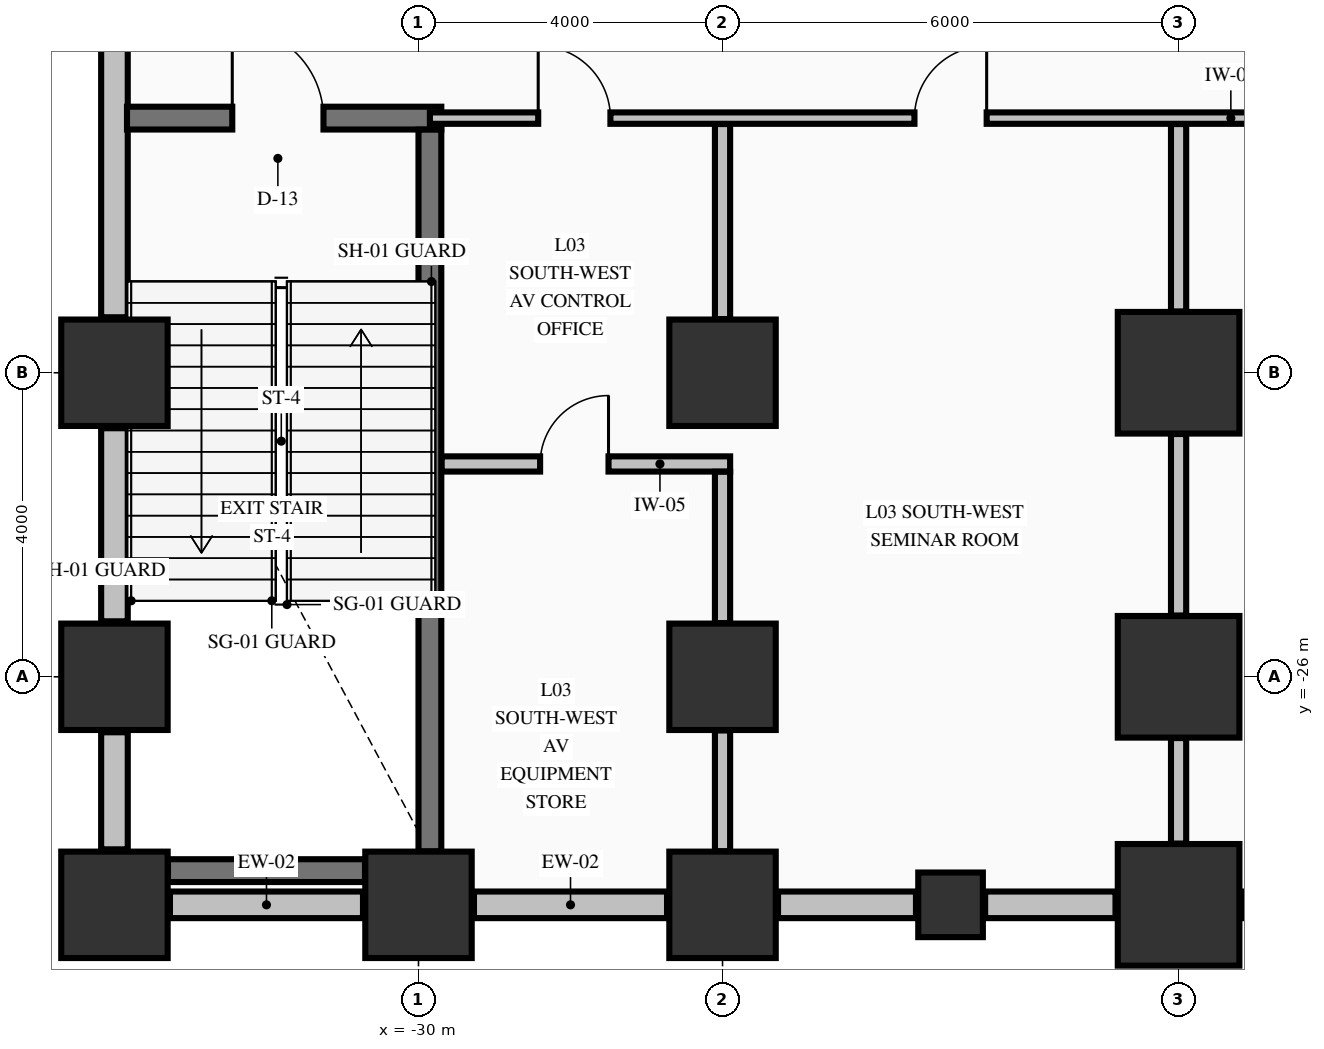
"""IFC4 building model, lengths in metres.
Left out: names, types, materials, properties, quantities, classifications, styles, units other than length and angle.
Written with IfcOpenShell. Run it as: python <this file> out.ifc"""

import sys

from ifc_helpers import new_model, si_unit, direction, frame, frame_2d, origin, origin_2d, place, context, subcontext, project, spatial, rectangle, extrude, element, fill, save


model = new_model("IFC4")
c1 = context("Model", 3, precision=1e-05, world=origin(), true_north=direction((0.0, 1.0)))
c2 = subcontext(c1, "Body", "Model", "MODEL_VIEW")
j1 = project(units=[si_unit("LENGTHUNIT", "METRE"), si_unit("PLANEANGLEUNIT", "RADIAN")], contexts=[c1])
p1 = place(None, origin())
s1 = spatial("IfcSite", under=j1, at=p1, CompositionType="ELEMENT")
p2 = place(p1, origin())
s2 = spatial("IfcBuilding", under=s1, at=p2, CompositionType="ELEMENT")
p3 = place(p2, frame((0.0, 0.0, 16.32)))
s3 = spatial("IfcBuildingStorey", under=s2, at=p3, CompositionType="ELEMENT", Elevation=16.32)
for number, where, z_axis, x_axis in (
    (1, (-34.0, -29.0, 0.0), (0.0, 0.0, 1.0), (1.0, 0.0, 0.0)),
    (2, (-34.0, -26.0, 0.0), (0.0, 0.0, 1.0), (1.0, 0.0, 0.0)),
    (3, (-34.0, -22.0, 0.0), (0.0, 0.0, 1.0), (1.0, 0.0, 0.0)),
    (4, (-30.0, -29.0, 0.0), (0.0, 0.0, 1.0), (1.0, 0.0, 0.0)),
    (5, (-26.0, -29.0, 0.0), (0.0, 0.0, 1.0), (1.0, 0.0, 0.0)),
    (6, (-26.0, -26.0, 0.0), (0.0, 0.0, 1.0), (1.0, 0.0, 0.0)),
    (7, (-26.0, -22.0, 0.0), (0.0, 0.0, 1.0), (1.0, 0.0, 0.0)),
):
    element("IfcColumn", number, at=place(p3, frame(where, z_axis=z_axis, x_axis=x_axis)), inside=s3, PredefinedType="COLUMN", context=c2, shape_type="SweptSolid", body=[
        extrude(rectangle(XDim=1.4, YDim=1.4, at=origin_2d()), origin(), (0.0, 0.0, 1.0), 4.99),
    ])
for number, where, z_axis, x_axis in (
    (8, (-20.0, -29.0, 0.0), (0.0, 0.0, 1.0), (1.0, 0.0, 0.0)),
    (9, (-20.0, -26.0, 0.0), (0.0, 0.0, 1.0), (1.0, 0.0, 0.0)),
    (10, (-20.0, -22.0, 0.0), (0.0, 0.0, 1.0), (1.0, 0.0, 0.0)),
):
    element("IfcColumn", number, at=place(p3, frame(where, z_axis=z_axis, x_axis=x_axis)), inside=s3, PredefinedType="COLUMN", context=c2, shape_type="SweptSolid", body=[
        extrude(rectangle(XDim=1.6, YDim=1.6, at=origin_2d()), origin(), (0.0, 0.0, 1.0), 4.99),
    ])
p4 = place(p3, frame((-23.0, -29.0, 0.0), z_axis=(0.0, 0.0, 1.0), x_axis=(1.0, 0.0, 0.0)))
e11 = element("IfcColumn", 11, at=p4, inside=s3, PredefinedType="PILASTER", context=c2, shape_type="SweptSolid", body=[
    extrude(rectangle(XDim=0.85, YDim=0.85, at=origin_2d()), origin(), (0.0, 0.0, 1.0), 4.99),
])
for number, where, z_axis, x_axis in (
    (12, (-33.27, -29.0, 0.0), (0.0, 0.0, 1.0), (1.0, 0.0, 0.0)),
    (13, (-29.27, -29.0, 0.0), (0.0, 0.0, 1.0), (1.0, 0.0, 0.0)),
):
    element("IfcWall", number, at=place(p3, frame(where, z_axis=z_axis, x_axis=x_axis)), inside=s3, PredefinedType="STANDARD", context=c2, shape_type="SweptSolid", body=[
        extrude(rectangle(XDim=2.54, YDim=0.35, at=frame_2d((1.27, 0.0))), origin(), (0.0, 0.0, 1.0), 3.332),
    ])
p5 = place(p3, frame((-25.27, -29.0, 0.0), z_axis=(0.0, 0.0, 1.0), x_axis=(1.0, 0.0, 0.0)))
e14 = element("IfcWall", 14, at=p5, inside=s3, PredefinedType="STANDARD", context=c2, shape_type="SweptSolid", body=[
    extrude(rectangle(XDim=1.815, YDim=0.35, at=frame_2d((0.907, 0.0))), origin(), (0.0, 0.0, 1.0), 3.332),
])
p6 = place(p3, frame((-22.545, -29.0, 0.0), z_axis=(0.0, 0.0, 1.0), x_axis=(1.0, 0.0, 0.0)))
e15 = element("IfcWall", 15, at=p6, inside=s3, PredefinedType="STANDARD", context=c2, shape_type="SweptSolid", body=[
    extrude(rectangle(XDim=1.715, YDim=0.35, at=frame_2d((0.857, 0.0))), origin(), (0.0, 0.0, 1.0), 3.332),
])
p7 = place(p3, frame((-19.17, -29.0, 0.0), z_axis=(0.0, 0.0, 1.0), x_axis=(1.0, 0.0, 0.0)))
e16 = element("IfcWall", 16, at=p7, inside=s3, PredefinedType="STANDARD", context=c2, shape_type="SweptSolid", body=[
    extrude(rectangle(XDim=7.34, YDim=0.35, at=frame_2d((3.67, 0.0))), origin(), (0.0, 0.0, 1.0), 3.332),
])
p8 = place(p3, frame((-34.0, -28.27, 0.0), z_axis=(0.0, 0.0, 1.0), x_axis=(0.0, 1.0, 0.0)))
e17 = element("IfcWall", 17, at=p8, inside=s3, PredefinedType="STANDARD", context=c2, shape_type="SweptSolid", body=[
    extrude(rectangle(XDim=1.54, YDim=0.35, at=frame_2d((0.77, 0.0))), origin(), (0.0, 0.0, 1.0), 4.99),
])
p9 = place(p3, frame((-34.0, -25.27, 0.0), z_axis=(0.0, 0.0, 1.0), x_axis=(0.0, 1.0, 0.0)))
e18 = element("IfcWall", 18, at=p9, inside=s3, PredefinedType="STANDARD", context=c2, shape_type="SweptSolid", body=[
    extrude(rectangle(XDim=2.54, YDim=0.35, at=frame_2d((1.27, 0.0))), origin(), (0.0, 0.0, 1.0), 4.99),
])
p10 = place(p3, frame((-34.0, -21.27, 0.0), z_axis=(0.0, 0.0, 1.0), x_axis=(0.0, 1.0, 0.0)))
e19 = element("IfcWall", 19, at=p10, inside=s3, PredefinedType="STANDARD", context=c2, shape_type="SweptSolid", body=[
    extrude(rectangle(XDim=4.54, YDim=0.35, at=frame_2d((2.27, 0.0))), origin(), (0.0, 0.0, 1.0), 4.99),
])
p11 = place(p3, frame((-33.296, -28.55, 0.0), z_axis=(0.0, 0.0, 1.0), x_axis=(1.0, 0.0, 0.0)))
e20 = element("IfcWall", 20, at=p11, inside=s3, PredefinedType="SHEAR", context=c2, shape_type="SweptSolid", body=[
    extrude(rectangle(XDim=2.592, YDim=0.3, at=frame_2d((1.296, 0.0))), origin(), (0.0, 0.0, 1.0), 4.99),
])
p12 = place(p3, frame((-33.835, -18.65, 0.0), z_axis=(0.0, 0.0, 1.0), x_axis=(1.0, 0.0, 0.0)))
e21 = element("IfcWall", 21, at=p12, inside=s3, PredefinedType="SHEAR", context=c2, shape_type="SweptSolid", body=[
    extrude(rectangle(XDim=4.135, YDim=0.3, at=frame_2d((2.067, 0.0))), origin(), (0.0, 0.0, 1.0), 4.99),
])
p13 = place(p12, frame((1.385, 0.0, 0.0)))
e22 = element("IfcOpeningElement", 22, at=p13, cuts=e21, PredefinedType="OPENING", context=c2, shape_type="SweptSolid", body=[
    extrude(rectangle(XDim=1.2, YDim=2.15, at=frame_2d((0.6, 1.075))), frame((0.0, 0.16, 0.0), z_axis=(0.0, -1.0, 0.0), x_axis=(1.0, 0.0, 0.0)), (0.0, 0.0, 1.0), 0.32),
])
p14 = place(p3, frame((-29.697, -23.2, 0.0), z_axis=(0.0, 0.0, 1.0), x_axis=(1.0, 0.0, 0.0)))
e23 = element("IfcWall", 23, at=p14, inside=s3, PredefinedType="PARTITIONING", context=c2, shape_type="SweptSolid", body=[
    extrude(rectangle(XDim=3.797, YDim=0.2, at=frame_2d((1.898, 0.0))), origin(), (0.0, 0.0, 1.0), 4.99),
])
p15 = place(p14, frame((1.297, 0.0, 0.0)))
e24 = element("IfcOpeningElement", 24, at=p15, cuts=e23, PredefinedType="OPENING", context=c2, shape_type="SweptSolid", body=[
    extrude(rectangle(XDim=0.9, YDim=2.15, at=frame_2d((0.45, 1.075))), frame((0.0, 0.11, 0.0), z_axis=(0.0, -1.0, 0.0), x_axis=(1.0, 0.0, 0.0)), (0.0, 0.0, 1.0), 0.22),
])
p16 = place(p3, frame((-29.85, -18.65, 0.0), z_axis=(0.0, 0.0, 1.0), x_axis=(1.0, 0.0, 0.0)))
e25 = element("IfcWall", 25, at=p16, inside=s3, PredefinedType="PARTITIONING", context=c2, shape_type="SweptSolid", body=[
    extrude(rectangle(XDim=21.085, YDim=0.15, at=frame_2d((10.542, 0.0))), origin(), (0.0, 0.0, 1.0), 4.99),
])
p17 = place(p16, frame((1.425, 0.0, 0.0)))
e26 = element("IfcOpeningElement", 26, at=p17, cuts=e25, PredefinedType="OPENING", context=c2, shape_type="SweptSolid", body=[
    extrude(rectangle(XDim=0.95, YDim=2.15, at=frame_2d((0.475, 1.075))), frame((0.0, 0.085, 0.0), z_axis=(0.0, -1.0, 0.0), x_axis=(1.0, 0.0, 0.0)), (0.0, 0.0, 1.0), 0.17),
])
p18 = place(p16, frame((6.375, 0.0, 0.0)))
e27 = element("IfcOpeningElement", 27, at=p18, cuts=e25, PredefinedType="OPENING", context=c2, shape_type="SweptSolid", body=[
    extrude(rectangle(XDim=0.95, YDim=2.15, at=frame_2d((0.475, 1.075))), frame((0.0, 0.085, 0.0), z_axis=(0.0, -1.0, 0.0), x_axis=(1.0, 0.0, 0.0)), (0.0, 0.0, 1.0), 0.17),
])
p19 = place(p16, frame((13.75, 0.0, 0.0)))
e28 = element("IfcOpeningElement", 28, at=p19, cuts=e25, PredefinedType="OPENING", context=c2, shape_type="SweptSolid", body=[
    extrude(rectangle(XDim=1.2, YDim=2.15, at=frame_2d((0.6, 1.075))), frame((0.0, 0.085, 0.0), z_axis=(0.0, -1.0, 0.0), x_axis=(1.0, 0.0, 0.0)), (0.0, 0.0, 1.0), 0.17),
])
p20 = place(p16, frame((19.575, 0.0, 0.0)))
e29 = element("IfcOpeningElement", 29, at=p20, cuts=e25, PredefinedType="OPENING", context=c2, shape_type="SweptSolid", body=[
    extrude(rectangle(XDim=0.95, YDim=2.15, at=frame_2d((0.475, 1.075))), frame((0.0, 0.085, 0.0), z_axis=(0.0, -1.0, 0.0), x_axis=(1.0, 0.0, 0.0)), (0.0, 0.0, 1.0), 0.17),
])
p21 = place(p3, frame((-29.85, -28.296, 0.0), z_axis=(0.0, 0.0, 1.0), x_axis=(0.0, 1.0, 0.0)))
e30 = element("IfcWall", 30, at=p21, inside=s3, PredefinedType="SHEAR", context=c2, shape_type="SweptSolid", body=[
    extrude(rectangle(XDim=9.494, YDim=0.3, at=frame_2d((4.747, 0.0))), origin(), (0.0, 0.0, 1.0), 4.99),
])
p22 = place(p3, frame((-26.0, -28.294, 0.0), z_axis=(0.0, 0.0, 1.0), x_axis=(0.0, 1.0, 0.0)))
e31 = element("IfcWall", 31, at=p22, inside=s3, PredefinedType="PARTITIONING", context=c2, shape_type="SweptSolid", body=[
    extrude(rectangle(XDim=1.588, YDim=0.2, at=frame_2d((0.794, 0.0))), origin(), (0.0, 0.0, 1.0), 3.332),
])
p23 = place(p3, frame((-26.0, -25.294, 0.0), z_axis=(0.0, 0.0, 1.0), x_axis=(0.0, 1.0, 0.0)))
e32 = element("IfcWall", 32, at=p23, inside=s3, PredefinedType="PARTITIONING", context=c2, shape_type="SweptSolid", body=[
    extrude(rectangle(XDim=1.991, YDim=0.2, at=frame_2d((0.996, 0.0))), origin(), (0.0, 0.0, 1.0), 3.332),
])
p24 = place(p3, frame((-26.0, -21.294, 0.0), z_axis=(0.0, 0.0, 1.0), x_axis=(0.0, 1.0, 0.0)))
e33 = element("IfcWall", 33, at=p24, inside=s3, PredefinedType="PARTITIONING", context=c2, shape_type="SweptSolid", body=[
    extrude(rectangle(XDim=2.566, YDim=0.2, at=frame_2d((1.283, 0.0))), origin(), (0.0, 0.0, 1.0), 3.332),
])
p25 = place(p3, frame((-20.0, -28.194, 0.0), z_axis=(0.0, 0.0, 1.0), x_axis=(0.0, 1.0, 0.0)))
e34 = element("IfcWall", 34, at=p25, inside=s3, PredefinedType="PARTITIONING", context=c2, shape_type="SweptSolid", body=[
    extrude(rectangle(XDim=1.388, YDim=0.2, at=frame_2d((0.694, 0.0))), origin(), (0.0, 0.0, 1.0), 3.332),
])
p26 = place(p3, frame((-20.0, -25.194, 0.0), z_axis=(0.0, 0.0, 1.0), x_axis=(0.0, 1.0, 0.0)))
e35 = element("IfcWall", 35, at=p26, inside=s3, PredefinedType="PARTITIONING", context=c2, shape_type="SweptSolid", body=[
    extrude(rectangle(XDim=2.388, YDim=0.2, at=frame_2d((1.194, 0.0))), origin(), (0.0, 0.0, 1.0), 3.332),
])
p27 = place(p3, frame((-20.0, -21.194, 0.0), z_axis=(0.0, 0.0, 1.0), x_axis=(0.0, 1.0, 0.0)))
e36 = element("IfcWall", 36, at=p27, inside=s3, PredefinedType="PARTITIONING", context=c2, shape_type="SweptSolid", body=[
    extrude(rectangle(XDim=2.466, YDim=0.2, at=frame_2d((1.233, 0.0))), origin(), (0.0, 0.0, 1.0), 3.332),
])
p28 = place(p13, origin())
e37 = element("IfcDoor", 37, at=p28, inside=s3, OperationType="SINGLE_SWING_LEFT", PredefinedType="DOOR", context=c2, shape_type="SweptSolid", body=[
    extrude(rectangle(XDim=1.2, YDim=2.15, at=frame_2d((0.6, 1.075))), frame((0.0, 0.025, 0.0), z_axis=(0.0, -1.0, 0.0), x_axis=(1.0, 0.0, 0.0)), (0.0, 0.0, 1.0), 0.05),
])
fill(e22, e37)
p29 = place(p15, origin())
e38 = element("IfcDoor", 38, at=p29, inside=s3, OperationType="SINGLE_SWING_RIGHT", PredefinedType="DOOR", context=c2, shape_type="SweptSolid", body=[
    extrude(rectangle(XDim=0.9, YDim=2.15, at=frame_2d((0.45, 1.075))), frame((0.0, 0.025, 0.0), z_axis=(0.0, -1.0, 0.0), x_axis=(1.0, 0.0, 0.0)), (0.0, 0.0, 1.0), 0.05),
])
fill(e24, e38)
p30 = place(p17, origin())
e39 = element("IfcDoor", 39, at=p30, inside=s3, OperationType="SINGLE_SWING_LEFT", PredefinedType="DOOR", context=c2, shape_type="SweptSolid", body=[
    extrude(rectangle(XDim=0.95, YDim=2.15, at=frame_2d((0.475, 1.075))), frame((0.0, 0.025, 0.0), z_axis=(0.0, -1.0, 0.0), x_axis=(1.0, 0.0, 0.0)), (0.0, 0.0, 1.0), 0.05),
])
fill(e26, e39)
p31 = place(p18, origin())
e40 = element("IfcDoor", 40, at=p31, inside=s3, OperationType="SINGLE_SWING_RIGHT", PredefinedType="DOOR", context=c2, shape_type="SweptSolid", body=[
    extrude(rectangle(XDim=0.95, YDim=2.15, at=frame_2d((0.475, 1.075))), frame((0.0, 0.025, 0.0), z_axis=(0.0, -1.0, 0.0), x_axis=(1.0, 0.0, 0.0)), (0.0, 0.0, 1.0), 0.05),
])
fill(e27, e40)
save(model, sys.argv[1])
